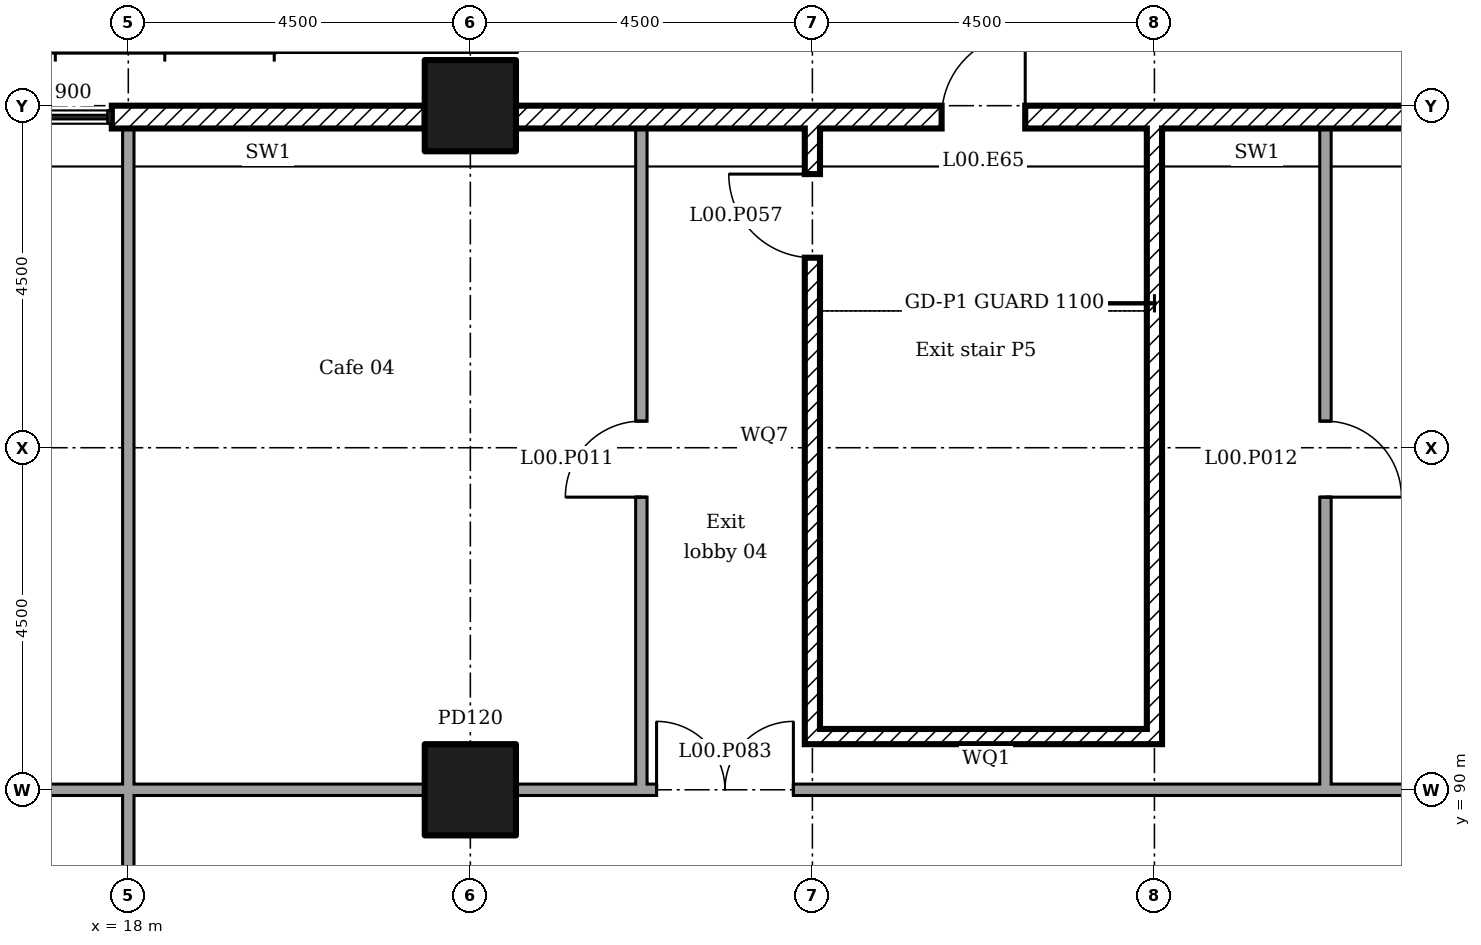
"""IFC4 building model, lengths in metres.
Left out: names, types, materials, properties, quantities, classifications, styles, units other than length and angle.
Written with IfcOpenShell. Run it as: python <this file> out.ifc"""

import sys

from ifc_helpers import new_model, si_unit, direction, frame, frame_2d, origin, origin_2d, place, context, subcontext, project, spatial, rectangle, extrude, element, fill, save


model = new_model("IFC4")
c1 = context("Model", 3, precision=1e-05, world=origin(), true_north=direction((0.0, 1.0)))
c2 = subcontext(c1, "Body", "Model", "MODEL_VIEW")
j1 = project(units=[si_unit("LENGTHUNIT", "METRE"), si_unit("PLANEANGLEUNIT", "RADIAN")], contexts=[c1])
p1 = place(None, origin())
s1 = spatial("IfcSite", under=j1, at=p1, CompositionType="ELEMENT")
p2 = place(p1, origin())
s2 = spatial("IfcBuilding", under=s1, at=p2, CompositionType="ELEMENT")
p3 = place(p2, origin())
s3 = spatial("IfcBuildingStorey", under=s2, at=p3, CompositionType="ELEMENT", Elevation=0.0)
for number, where in (
    (1, (22.5, 90.0, 0.0)),
    (2, (22.5, 99.0, 0.0)),
):
    element("IfcColumn", number, at=place(p3, frame(where)), inside=s3, PredefinedType="COLUMN", context=c2, shape_type="SweptSolid", body=[
        extrude(rectangle(XDim=1.2, YDim=1.2, at=origin_2d()), origin(), (0.0, 0.0, 1.0), 6.0),
    ])
p4 = place(p3, frame((35.4, 98.85, 0.0), z_axis=(0.0, 0.0, 1.0), x_axis=(-1.0, 0.0, 0.0)))
e3 = element("IfcWall", 3, at=p4, inside=s3, PredefinedType="ELEMENTEDWALL", context=c2, shape_type="SweptSolid", body=[
    extrude(rectangle(XDim=5.1, YDim=0.3, at=frame_2d((2.55, 0.0))), origin(), (0.0, 0.0, 1.0), 5.55),
])
p5 = place(p3, frame((30.3, 98.85, 0.0), z_axis=(0.0, 0.0, 1.0), x_axis=(-1.0, 0.0, 0.0)))
e4 = element("IfcWall", 4, at=p5, inside=s3, PredefinedType="ELEMENTEDWALL", context=c2, shape_type="SweptSolid", body=[
    extrude(rectangle(XDim=2.1, YDim=0.3, at=frame_2d((1.05, 0.0))), origin(), (0.0, 0.0, 1.0), 5.55),
])
p6 = place(p5, frame((0.5, 0.0, 0.0)))
e5 = element("IfcOpeningElement", 5, at=p6, cuts=e4, PredefinedType="OPENING", context=c2, shape_type="SweptSolid", body=[
    extrude(rectangle(XDim=1.1, YDim=2.4, at=frame_2d((0.55, 1.2))), frame((0.0, 0.16, 0.0), z_axis=(0.0, -1.0, 0.0), x_axis=(1.0, 0.0, 0.0)), (0.0, 0.0, 1.0), 0.32),
])
p7 = place(p3, frame((28.2, 98.85, 0.0), z_axis=(0.0, 0.0, 1.0), x_axis=(-1.0, 0.0, 0.0)))
e6 = element("IfcWall", 6, at=p7, inside=s3, PredefinedType="ELEMENTEDWALL", context=c2, shape_type="SweptSolid", body=[
    extrude(rectangle(XDim=5.1, YDim=0.3, at=frame_2d((2.55, 0.0))), origin(), (0.0, 0.0, 1.0), 5.55),
])
p8 = place(p3, frame((21.9, 98.85, 0.0), z_axis=(0.0, 0.0, 1.0), x_axis=(-1.0, 0.0, 0.0)))
e7 = element("IfcWall", 7, at=p8, inside=s3, PredefinedType="ELEMENTEDWALL", context=c2, shape_type="SweptSolid", body=[
    extrude(rectangle(XDim=4.116, YDim=0.3, at=frame_2d((2.058, 0.0))), origin(), (0.0, 0.0, 1.0), 5.55),
])
p9 = place(p3, frame((18.0, 80.925, 0.0), z_axis=(0.0, 0.0, 1.0), x_axis=(0.0, 1.0, 0.0)))
e8 = element("IfcWall", 8, at=p9, inside=s3, PredefinedType="PARTITIONING", context=c2, shape_type="SweptSolid", body=[
    extrude(rectangle(XDim=9.15, YDim=0.15, at=frame_2d((4.575, 0.0))), origin(), (0.0, 0.0, 1.0), 5.55),
])
p10 = place(p9, frame((3.675, 0.0, 0.0)))
e9 = element("IfcOpeningElement", 9, at=p10, cuts=e8, PredefinedType="OPENING", context=c2, shape_type="SweptSolid", body=[
    extrude(rectangle(XDim=1.8, YDim=2.1, at=frame_2d((0.9, 1.05))), frame((0.0, 0.085, 0.0), z_axis=(0.0, -1.0, 0.0), x_axis=(1.0, 0.0, 0.0)), (0.0, 0.0, 1.0), 0.17),
])
p11 = place(p3, frame((9.595, 90.0, 0.0)))
e10 = element("IfcWall", 10, at=p11, inside=s3, PredefinedType="PARTITIONING", context=c2, shape_type="SweptSolid", body=[
    extrude(rectangle(XDim=8.48, YDim=0.15, at=frame_2d((4.24, 0.0))), origin(), (0.0, 0.0, 1.0), 5.55),
])
p12 = place(p11, frame((3.7, 0.0, 0.0)))
e11 = element("IfcOpeningElement", 11, at=p12, cuts=e10, PredefinedType="OPENING", context=c2, shape_type="SweptSolid", body=[
    extrude(rectangle(XDim=1.0, YDim=2.1, at=frame_2d((0.5, 1.05))), frame((0.0, 0.085, 0.0), z_axis=(0.0, -1.0, 0.0), x_axis=(1.0, 0.0, 0.0)), (0.0, 0.0, 1.0), 0.17),
])
p13 = place(p3, frame((18.075, 90.0, 0.0)))
e12 = element("IfcWall", 12, at=p13, inside=s3, PredefinedType="PARTITIONING", context=c2, shape_type="SweptSolid", body=[
    extrude(rectangle(XDim=3.83, YDim=0.15, at=frame_2d((1.915, 0.0))), origin(), (0.0, 0.0, 1.0), 5.55),
])
p14 = place(p3, frame((23.095, 90.0, 0.0)))
e13 = element("IfcWall", 13, at=p14, inside=s3, PredefinedType="PARTITIONING", context=c2, shape_type="SweptSolid", body=[
    extrude(rectangle(XDim=1.73, YDim=0.15, at=frame_2d((0.865, 0.0))), origin(), (0.0, 0.0, 1.0), 5.55),
])
p15 = place(p3, frame((24.75, 90.0, 0.0)))
e14 = element("IfcWall", 14, at=p15, inside=s3, PredefinedType="PARTITIONING", context=c2, shape_type="SweptSolid", body=[
    extrude(rectangle(XDim=9.075, YDim=0.15, at=frame_2d((4.538, 0.0))), origin(), (0.0, 0.0, 1.0), 5.55),
])
p16 = place(p15, frame((0.2, 0.0, 0.0)))
e15 = element("IfcOpeningElement", 15, at=p16, cuts=e14, PredefinedType="OPENING", context=c2, shape_type="SweptSolid", body=[
    extrude(rectangle(XDim=1.8, YDim=2.1, at=frame_2d((0.9, 1.05))), frame((0.0, 0.085, 0.0), z_axis=(0.0, -1.0, 0.0), x_axis=(1.0, 0.0, 0.0)), (0.0, 0.0, 1.0), 0.17),
])
p17 = place(p3, frame((33.75, 90.0, 0.0)))
e16 = element("IfcWall", 16, at=p17, inside=s3, PredefinedType="PARTITIONING", context=c2, shape_type="SweptSolid", body=[
    extrude(rectangle(XDim=1.655, YDim=0.15, at=frame_2d((0.828, 0.0))), origin(), (0.0, 0.0, 1.0), 5.55),
])
p18 = place(p3, frame((18.0, 90.075, 0.0), z_axis=(0.0, 0.0, 1.0), x_axis=(0.0, 1.0, 0.0)))
e17 = element("IfcWall", 17, at=p18, inside=s3, PredefinedType="PARTITIONING", context=c2, shape_type="SweptSolid", body=[
    extrude(rectangle(XDim=8.625, YDim=0.15, at=frame_2d((4.312, 0.0))), origin(), (0.0, 0.0, 1.0), 5.55),
])
p19 = place(p3, frame((24.75, 90.075, 0.0), z_axis=(0.0, 0.0, 1.0), x_axis=(0.0, 1.0, 0.0)))
e18 = element("IfcWall", 18, at=p19, inside=s3, PredefinedType="PARTITIONING", context=c2, shape_type="SweptSolid", body=[
    extrude(rectangle(XDim=8.625, YDim=0.15, at=frame_2d((4.312, 0.0))), origin(), (0.0, 0.0, 1.0), 5.55),
])
p20 = place(p19, frame((3.775, 0.0, 0.0)))
e19 = element("IfcOpeningElement", 19, at=p20, cuts=e18, PredefinedType="OPENING", context=c2, shape_type="SweptSolid", body=[
    extrude(rectangle(XDim=1.0, YDim=2.1, at=frame_2d((0.5, 1.05))), frame((0.0, 0.085, 0.0), z_axis=(0.0, -1.0, 0.0), x_axis=(1.0, 0.0, 0.0)), (0.0, 0.0, 1.0), 0.17),
])
p21 = place(p3, frame((33.75, 90.075, 0.0), z_axis=(0.0, 0.0, 1.0), x_axis=(0.0, 1.0, 0.0)))
e20 = element("IfcWall", 20, at=p21, inside=s3, PredefinedType="PARTITIONING", context=c2, shape_type="SweptSolid", body=[
    extrude(rectangle(XDim=8.625, YDim=0.15, at=frame_2d((4.312, 0.0))), origin(), (0.0, 0.0, 1.0), 5.55),
])
p22 = place(p21, frame((3.775, 0.0, 0.0)))
e21 = element("IfcOpeningElement", 21, at=p22, cuts=e20, PredefinedType="OPENING", context=c2, shape_type="SweptSolid", body=[
    extrude(rectangle(XDim=1.0, YDim=2.1, at=frame_2d((0.5, 1.05))), frame((0.0, 0.085, 0.0), z_axis=(0.0, -1.0, 0.0), x_axis=(1.0, 0.0, 0.0)), (0.0, 0.0, 1.0), 0.17),
])
p23 = place(p3, frame((27.0, 90.6, 0.0), z_axis=(0.0, 0.0, 1.0), x_axis=(0.0, 1.0, 0.0)))
e22 = element("IfcWall", 22, at=p23, inside=s3, PredefinedType="SOLIDWALL", context=c2, shape_type="SweptSolid", body=[
    extrude(rectangle(XDim=8.1, YDim=0.2, at=frame_2d((4.05, 0.0))), origin(), (0.0, 0.0, 1.0), 5.55),
])
p24 = place(p23, frame((6.4, 0.0, 0.0)))
e23 = element("IfcOpeningElement", 23, at=p24, cuts=e22, PredefinedType="OPENING", context=c2, shape_type="SweptSolid", body=[
    extrude(rectangle(XDim=1.1, YDim=2.1, at=frame_2d((0.55, 1.05))), frame((0.0, 0.11, 0.0), z_axis=(0.0, -1.0, 0.0), x_axis=(1.0, 0.0, 0.0)), (0.0, 0.0, 1.0), 0.22),
])
p25 = place(p3, frame((31.5, 90.6, 0.0), z_axis=(0.0, 0.0, 1.0), x_axis=(0.0, 1.0, 0.0)))
e24 = element("IfcWall", 24, at=p25, inside=s3, PredefinedType="SOLIDWALL", context=c2, shape_type="SweptSolid", body=[
    extrude(rectangle(XDim=8.1, YDim=0.2, at=frame_2d((4.05, 0.0))), origin(), (0.0, 0.0, 1.0), 5.55),
])
p26 = place(p3, frame((27.1, 90.7, 0.0)))
e25 = element("IfcWall", 25, at=p26, inside=s3, PredefinedType="SOLIDWALL", context=c2, shape_type="SweptSolid", body=[
    extrude(rectangle(XDim=4.3, YDim=0.2, at=frame_2d((2.15, 0.0))), origin(), (0.0, 0.0, 1.0), 5.55),
])
p27 = place(p6, frame((1.1, 0.0, 0.0), x_axis=(-1.0, 0.0, 0.0)))
e26 = element("IfcDoor", 26, at=p27, inside=s3, OperationType="SINGLE_SWING_LEFT", PredefinedType="NOTDEFINED", context=c2, shape_type="SweptSolid", body=[
    extrude(rectangle(XDim=1.1, YDim=2.4, at=frame_2d((0.55, 1.2))), frame((0.0, 0.025, 0.0), z_axis=(0.0, -1.0, 0.0), x_axis=(1.0, 0.0, 0.0)), (0.0, 0.0, 1.0), 0.05),
])
fill(e5, e26)
p28 = place(p20, origin())
e27 = element("IfcDoor", 27, at=p28, inside=s3, OperationType="SINGLE_SWING_RIGHT", PredefinedType="DOOR", context=c2, shape_type="SweptSolid", body=[
    extrude(rectangle(XDim=1.0, YDim=2.1, at=frame_2d((0.5, 1.05))), frame((0.0, 0.025, 0.0), z_axis=(0.0, -1.0, 0.0), x_axis=(1.0, 0.0, 0.0)), (0.0, 0.0, 1.0), 0.05),
])
fill(e19, e27)
p29 = place(p22, frame((1.0, 0.0, 0.0), x_axis=(-1.0, 0.0, 0.0)))
e28 = element("IfcDoor", 28, at=p29, inside=s3, OperationType="SINGLE_SWING_LEFT", PredefinedType="DOOR", context=c2, shape_type="SweptSolid", body=[
    extrude(rectangle(XDim=1.0, YDim=2.1, at=frame_2d((0.5, 1.05))), frame((0.0, 0.025, 0.0), z_axis=(0.0, -1.0, 0.0), x_axis=(1.0, 0.0, 0.0)), (0.0, 0.0, 1.0), 0.05),
])
fill(e21, e28)
p30 = place(p24, origin())
e29 = element("IfcDoor", 29, at=p30, inside=s3, OperationType="SINGLE_SWING_LEFT", PredefinedType="DOOR", context=c2, shape_type="SweptSolid", body=[
    extrude(rectangle(XDim=1.1, YDim=2.1, at=frame_2d((0.55, 1.05))), frame((0.0, 0.025, 0.0), z_axis=(0.0, -1.0, 0.0), x_axis=(1.0, 0.0, 0.0)), (0.0, 0.0, 1.0), 0.05),
])
fill(e23, e29)
p31 = place(p16, origin())
e30 = element("IfcDoor", 30, at=p31, inside=s3, OperationType="DOUBLE_DOOR_SINGLE_SWING", PredefinedType="DOOR", context=c2, shape_type="SweptSolid", body=[
    extrude(rectangle(XDim=1.8, YDim=2.1, at=frame_2d((0.9, 1.05))), frame((0.0, 0.025, 0.0), z_axis=(0.0, -1.0, 0.0), x_axis=(1.0, 0.0, 0.0)), (0.0, 0.0, 1.0), 0.05),
])
fill(e15, e30)
save(model, sys.argv[1])
